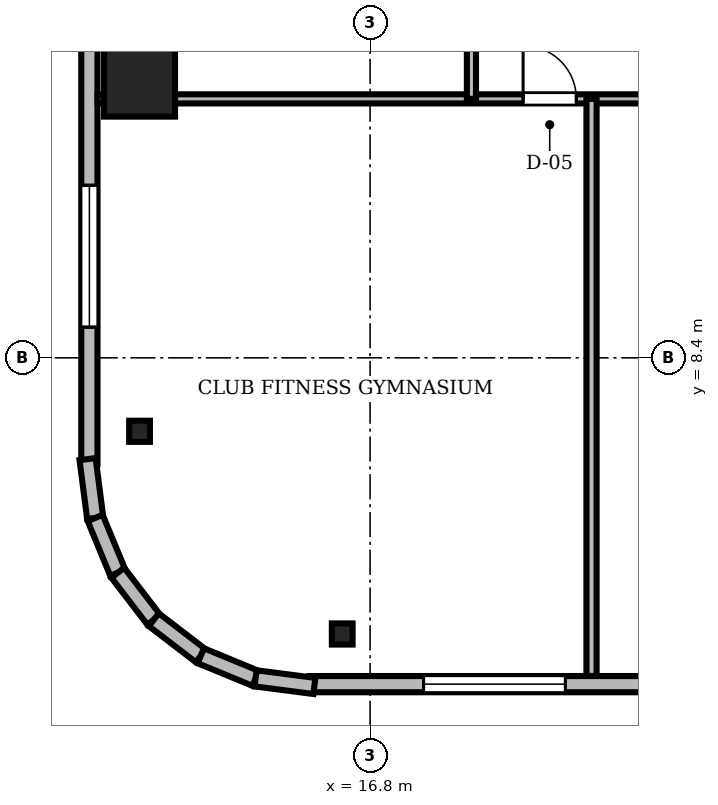
"""IFC4 building model, lengths in metres.
Left out: names, types, materials, properties, quantities, classifications, styles, units other than length and angle.
Written with IfcOpenShell. Run it as: python <this file> out.ifc"""

import sys

from ifc_helpers import new_model, si_unit, direction, frame, frame_2d, origin, origin_2d, place, context, subcontext, project, spatial, rectangle, i_section, extrude, source, transform, mapped, element, fill, save


model = new_model("IFC4")
c1 = context("Model", 3, precision=1e-05, world=origin(), true_north=direction((0.0, 1.0)))
c2 = subcontext(c1, "Body", "Model", "MODEL_VIEW")
j1 = project(units=[si_unit("LENGTHUNIT", "METRE"), si_unit("PLANEANGLEUNIT", "RADIAN")], contexts=[c1])
p1 = place(None, origin())
s1 = spatial("IfcSite", under=j1, at=p1, CompositionType="ELEMENT")
p2 = place(p1, origin())
s2 = spatial("IfcBuilding", under=s1, at=p2, CompositionType="ELEMENT")
p3 = place(p2, frame((0.0, 0.0, 211.05)))
s3 = spatial("IfcBuildingStorey", under=s2, at=p3, CompositionType="ELEMENT", Elevation=211.05)
m1 = source(origin(), c2, "Body", "SweptSolid", [
    extrude(rectangle(XDim=1.4, YDim=1.4, at=origin_2d()), origin(), (0.0, 0.0, 1.0), 3.53),
])
p4 = place(p3, frame((12.25, 13.86, 0.0), z_axis=(0.0, 0.0, 1.0), x_axis=(1.0, 0.0, 0.0)))
e1 = element("IfcColumn", 1, at=p4, inside=s3, PredefinedType="COLUMN", context=c2, shape_type="MappedRepresentation", body=[
    mapped(m1, transform((0.0, 0.0, 0.0), scale=1.0)),
])
m2 = source(origin(), c2, "Body", "SweptSolid", [
    extrude(i_section(OverallWidth=0.409, OverallDepth=0.417, WebThickness=0.021, FlangeThickness=0.033, FilletRadius=0.015, at=origin_2d()), origin(), (0.0, 0.0, 1.0), 3.53),
])
for number, where, z_axis, x_axis in (
    (2, (16.25, 2.95, 0.0), (0.0, 0.0, 1.0), (1.0, 0.0, 0.0)),
    (3, (12.25, 6.95, 0.0), (0.0, 0.0, 1.0), (1.0, 0.0, 0.0)),
):
    element("IfcColumn", number, at=place(p3, frame(where, z_axis=z_axis, x_axis=x_axis)), inside=s3, PredefinedType="COLUMN", context=c2, shape_type="MappedRepresentation", body=[
        mapped(m2, transform((0.0, 0.0, 0.0), scale=1.0)),
    ])
m3 = source(origin(), c2, "Body", "SweptSolid", [
    extrude(rectangle(XDim=15.6, YDim=0.32, at=frame_2d((7.8, 0.0))), origin(), (0.0, 0.0, 1.0), 3.53),
])
p5 = place(p3, frame((15.6, 1.96, 0.0), z_axis=(0.0, 0.0, 1.0), x_axis=(1.0, 0.0, 0.0)))
e4 = element("IfcWall", 4, at=p5, inside=s3, PredefinedType="SOLIDWALL", context=c2, shape_type="MappedRepresentation", body=[
    mapped(m3, transform((0.0, 0.0, 0.0), scale=1.0)),
])
m4 = source(origin(), c2, "Body", "SweptSolid", [
    extrude(rectangle(XDim=1.4, YDim=2.3, at=frame_2d((0.7, 1.15))), frame((0.0, 0.17, 0.0), z_axis=(0.0, -1.0, 0.0), x_axis=(1.0, 0.0, 0.0)), (0.0, 0.0, 1.0), 0.34),
])
p6 = place(p5, frame((9.61, 0.0, 0.0)))
e5 = element("IfcOpeningElement", 5, at=p6, cuts=e4, PredefinedType="OPENING", context=c2, shape_type="MappedRepresentation", body=[
    mapped(m4, transform((0.0, 0.0, 0.0), scale=1.0)),
])
m5 = source(origin(), c2, "Body", "SweptSolid", [
    extrude(rectangle(XDim=2.8, YDim=2.4, at=frame_2d((1.4, 1.2))), frame((0.0, 0.17, 0.0), z_axis=(0.0, -1.0, 0.0), x_axis=(1.0, 0.0, 0.0)), (0.0, 0.0, 1.0), 0.34),
])
p7 = place(p5, frame((2.255, 0.0, 0.72)))
e6 = element("IfcOpeningElement", 6, at=p7, cuts=e4, PredefinedType="OPENING", context=c2, shape_type="MappedRepresentation", body=[
    mapped(m5, transform((0.0, 0.0, 0.0), scale=1.0)),
])
p8 = place(p3, frame((11.26, 21.9, 0.0), z_axis=(0.0, 0.0, 1.0), x_axis=(0.0, -1.0, 0.0)))
e7 = element("IfcWall", 7, at=p8, inside=s3, PredefinedType="SOLIDWALL", context=c2, shape_type="MappedRepresentation", body=[
    mapped(m3, transform((0.0, 0.0, 0.0), scale=1.0)),
])
p9 = place(p8, frame((10.095, 0.0, 0.72)))
e8 = element("IfcOpeningElement", 8, at=p9, cuts=e7, PredefinedType="OPENING", context=c2, shape_type="MappedRepresentation", body=[
    mapped(m5, transform((0.0, 0.0, 0.0), scale=1.0)),
])
m6 = source(origin(), c2, "Body", "SweptSolid", [
    extrude(rectangle(XDim=1.171, YDim=0.32, at=frame_2d((0.585, 0.0))), origin(), (0.0, 0.0, 1.0), 3.53),
])
p10 = place(p3, frame((11.224, 6.401, 0.0), z_axis=(0.0, 0.0, 1.0), x_axis=(0.128269133229, -0.991739395941, 0.0)))
e9 = element("IfcWall", 9, at=p10, inside=s3, PredefinedType="SOLIDWALL", context=c2, shape_type="MappedRepresentation", body=[
    mapped(m6, transform((0.0, 0.0, 0.0), scale=1.0)),
])
m7 = source(origin(), c2, "Body", "SweptSolid", [
    extrude(rectangle(XDim=1.169, YDim=0.32, at=frame_2d((0.584, 0.0))), origin(), (0.0, 0.0, 1.0), 3.53),
])
for number, where, z_axis, x_axis in (
    (10, (11.375, 5.24, 0.0), (0.0, 0.0, 1.0), (0.381, -0.925, 0.0)),
    (11, (11.82, 4.159, 0.0), (0.0, 0.0, 1.0), (0.608, -0.794, 0.0)),
):
    element("IfcWall", number, at=place(p3, frame(where, z_axis=z_axis, x_axis=x_axis)), inside=s3, PredefinedType="SOLIDWALL", context=c2, shape_type="MappedRepresentation", body=[
        mapped(m7, transform((0.0, 0.0, 0.0), scale=1.0)),
    ])
m8 = source(origin(), c2, "Body", "SweptSolid", [
    extrude(rectangle(XDim=1.169, YDim=0.32, at=frame_2d((0.584, 0.0))), origin(), (0.0, 0.0, 1.0), 3.53),
])
p11 = place(p3, frame((12.531, 3.231, 0.0), z_axis=(0.0, 0.0, 1.0), x_axis=(0.793663520347, -0.608356981114, 0.0)))
e12 = element("IfcWall", 12, at=p11, inside=s3, PredefinedType="SOLIDWALL", context=c2, shape_type="MappedRepresentation", body=[
    mapped(m8, transform((0.0, 0.0, 0.0), scale=1.0)),
])
m9 = source(origin(), c2, "Body", "SweptSolid", [
    extrude(rectangle(XDim=1.169, YDim=0.32, at=frame_2d((0.585, 0.0))), origin(), (0.0, 0.0, 1.0), 3.53),
])
p12 = place(p3, frame((13.459, 2.52, 0.0), z_axis=(0.0, 0.0, 1.0), x_axis=(0.924479075121, -0.381232789334, 0.0)))
e13 = element("IfcWall", 13, at=p12, inside=s3, PredefinedType="SOLIDWALL", context=c2, shape_type="MappedRepresentation", body=[
    mapped(m9, transform((0.0, 0.0, 0.0), scale=1.0)),
])
m10 = source(origin(), c2, "Body", "SweptSolid", [
    extrude(rectangle(XDim=1.17, YDim=0.32, at=frame_2d((0.585, 0.0))), origin(), (0.0, 0.0, 1.0), 3.53),
])
p13 = place(p3, frame((14.54, 2.074, 0.0), z_axis=(0.0, 0.0, 1.0), x_axis=(0.991762485493, -0.128090485085, 0.0)))
e14 = element("IfcWall", 14, at=p13, inside=s3, PredefinedType="SOLIDWALL", context=c2, shape_type="MappedRepresentation", body=[
    mapped(m10, transform((0.0, 0.0, 0.0), scale=1.0)),
])
m11 = source(origin(), c2, "Body", "SweptSolid", [
    extrude(rectangle(XDim=46.156, YDim=0.18, at=frame_2d((23.078, 0.0))), origin(), (0.0, 0.0, 1.0), 2.772),
])
p14 = place(p3, frame((11.422, 13.51, 0.0), z_axis=(0.0, 0.0, 1.0), x_axis=(1.0, 0.0, 0.0)))
e15 = element("IfcWall", 15, at=p14, inside=s3, PredefinedType="PARTITIONING", context=c2, shape_type="MappedRepresentation", body=[
    mapped(m11, transform((0.0, 0.0, 0.0), scale=1.0)),
])
m12 = source(origin(), c2, "Body", "SweptSolid", [
    extrude(rectangle(XDim=1.05, YDim=2.2, at=frame_2d((0.525, 1.1))), frame((0.0, 0.1, 0.0), z_axis=(0.0, -1.0, 0.0), x_axis=(1.0, 0.0, 0.0)), (0.0, 0.0, 1.0), 0.2),
])
p15 = place(p14, frame((8.398, 0.0, 0.0)))
e16 = element("IfcOpeningElement", 16, at=p15, cuts=e15, PredefinedType="OPENING", context=c2, shape_type="MappedRepresentation", body=[
    mapped(m12, transform((0.0, 0.0, 0.0), scale=1.0)),
])
p16 = place(p14, frame((10.953, 0.0, 0.0)))
e17 = element("IfcOpeningElement", 17, at=p16, cuts=e15, PredefinedType="OPENING", context=c2, shape_type="MappedRepresentation", body=[
    mapped(m12, transform((0.0, 0.0, 0.0), scale=1.0)),
])
p17 = place(p14, frame((14.645, 0.0, 0.0)))
e18 = element("IfcOpeningElement", 18, at=p17, cuts=e15, PredefinedType="OPENING", context=c2, shape_type="MappedRepresentation", body=[
    mapped(m12, transform((0.0, 0.0, 0.0), scale=1.0)),
])
m13 = source(origin(), c2, "Body", "SweptSolid", [
    extrude(rectangle(XDim=0.95, YDim=2.15, at=frame_2d((0.475, 1.075))), frame((0.0, 0.1, 0.0), z_axis=(0.0, -1.0, 0.0), x_axis=(1.0, 0.0, 0.0)), (0.0, 0.0, 1.0), 0.2),
])
p18 = place(p14, frame((20.057, 0.0, 0.0)))
e19 = element("IfcOpeningElement", 19, at=p18, cuts=e15, PredefinedType="OPENING", context=c2, shape_type="MappedRepresentation", body=[
    mapped(m13, transform((0.0, 0.0, 0.0), scale=1.0)),
])
p19 = place(p14, frame((23.274, 0.0, 0.0)))
e20 = element("IfcOpeningElement", 20, at=p19, cuts=e15, PredefinedType="OPENING", context=c2, shape_type="MappedRepresentation", body=[
    mapped(m12, transform((0.0, 0.0, 0.0), scale=1.0)),
])
p20 = place(p14, frame((27.716, 0.0, 0.0)))
e21 = element("IfcOpeningElement", 21, at=p20, cuts=e15, PredefinedType="OPENING", context=c2, shape_type="MappedRepresentation", body=[
    mapped(m12, transform((0.0, 0.0, 0.0), scale=1.0)),
])
p21 = place(p14, frame((32.907, 0.0, 0.0)))
e22 = element("IfcOpeningElement", 22, at=p21, cuts=e15, PredefinedType="OPENING", context=c2, shape_type="MappedRepresentation", body=[
    mapped(m12, transform((0.0, 0.0, 0.0), scale=1.0)),
])
p22 = place(p14, frame((37.498, 0.0, 0.0)))
e23 = element("IfcOpeningElement", 23, at=p22, cuts=e15, PredefinedType="OPENING", context=c2, shape_type="MappedRepresentation", body=[
    mapped(m12, transform((0.0, 0.0, 0.0), scale=1.0)),
])
m14 = source(origin(), c2, "Body", "SweptSolid", [
    extrude(rectangle(XDim=15.04, YDim=0.18, at=frame_2d((7.52, 0.0))), origin(), (0.0, 0.0, 1.0), 2.972),
])
p23 = place(p3, frame((18.8, 13.51, 0.0), z_axis=(0.0, 0.0, 1.0), x_axis=(0.0, 1.0, 0.0)))
e24 = element("IfcWall", 24, at=p23, inside=s3, PredefinedType="PARTITIONING", context=c2, shape_type="MappedRepresentation", body=[
    mapped(m14, transform((0.0, 0.0, 0.0), scale=1.0)),
])
p24 = place(p23, frame((1.962, 0.0, 0.0)))
e25 = element("IfcOpeningElement", 25, at=p24, cuts=e24, PredefinedType="OPENING", context=c2, shape_type="MappedRepresentation", body=[
    mapped(m12, transform((0.0, 0.0, 0.0), scale=1.0)),
])
p25 = place(p23, frame((8.15, 0.0, 0.0)))
e26 = element("IfcOpeningElement", 26, at=p25, cuts=e24, PredefinedType="OPENING", context=c2, shape_type="MappedRepresentation", body=[
    mapped(m13, transform((0.0, 0.0, 0.0), scale=1.0)),
])
p26 = place(p23, frame((13.113, 0.0, 0.0)))
e27 = element("IfcOpeningElement", 27, at=p26, cuts=e24, PredefinedType="OPENING", context=c2, shape_type="MappedRepresentation", body=[
    mapped(m13, transform((0.0, 0.0, 0.0), scale=1.0)),
])
m15 = source(origin(), c2, "Body", "SweptSolid", [
    extrude(rectangle(XDim=11.388, YDim=0.2, at=frame_2d((5.694, 0.0))), origin(), (0.0, 0.0, 1.0), 2.772),
])
p27 = place(p3, frame((21.17, 2.122, 0.0), z_axis=(0.0, 0.0, 1.0), x_axis=(0.0, 1.0, 0.0)))
e28 = element("IfcWall", 28, at=p27, inside=s3, PredefinedType="PARTITIONING", context=c2, shape_type="MappedRepresentation", body=[
    mapped(m15, transform((0.0, 0.0, 0.0), scale=1.0)),
])
m16 = source(origin(), c2, "Body", "SweptSolid", [
    extrude(rectangle(XDim=2.8, YDim=2.4, at=frame_2d((1.4, 1.2))), frame((0.0, 0.03, 0.0), z_axis=(0.0, -1.0, 0.0), x_axis=(1.0, 0.0, 0.0)), (0.0, 0.0, 1.0), 0.06),
])
p28 = place(p7, origin())
e29 = element("IfcWindow", 29, at=p28, inside=s3, PartitioningType="SINGLE_PANEL", PredefinedType="WINDOW", context=c2, shape_type="MappedRepresentation", body=[
    mapped(m16, transform((0.0, 0.0, 0.0), scale=1.0)),
])
fill(e6, e29)
p29 = place(p9, origin())
e30 = element("IfcWindow", 30, at=p29, inside=s3, PartitioningType="SINGLE_PANEL", PredefinedType="WINDOW", context=c2, shape_type="MappedRepresentation", body=[
    mapped(m16, transform((0.0, 0.0, 0.0), scale=1.0)),
])
fill(e8, e30)
m17 = source(origin(), c2, "Body", "SweptSolid", [
    extrude(rectangle(XDim=1.05, YDim=2.2, at=frame_2d((0.525, 1.1))), frame((0.0, 0.025, 0.0), z_axis=(0.0, -1.0, 0.0), x_axis=(1.0, 0.0, 0.0)), (0.0, 0.0, 1.0), 0.05),
])
p30 = place(p15, origin())
e31 = element("IfcDoor", 31, at=p30, inside=s3, OperationType="SINGLE_SWING_LEFT", PredefinedType="DOOR", context=c2, shape_type="MappedRepresentation", body=[
    mapped(m17, transform((0.0, 0.0, 0.0), scale=1.0)),
])
fill(e16, e31)
save(model, sys.argv[1])
